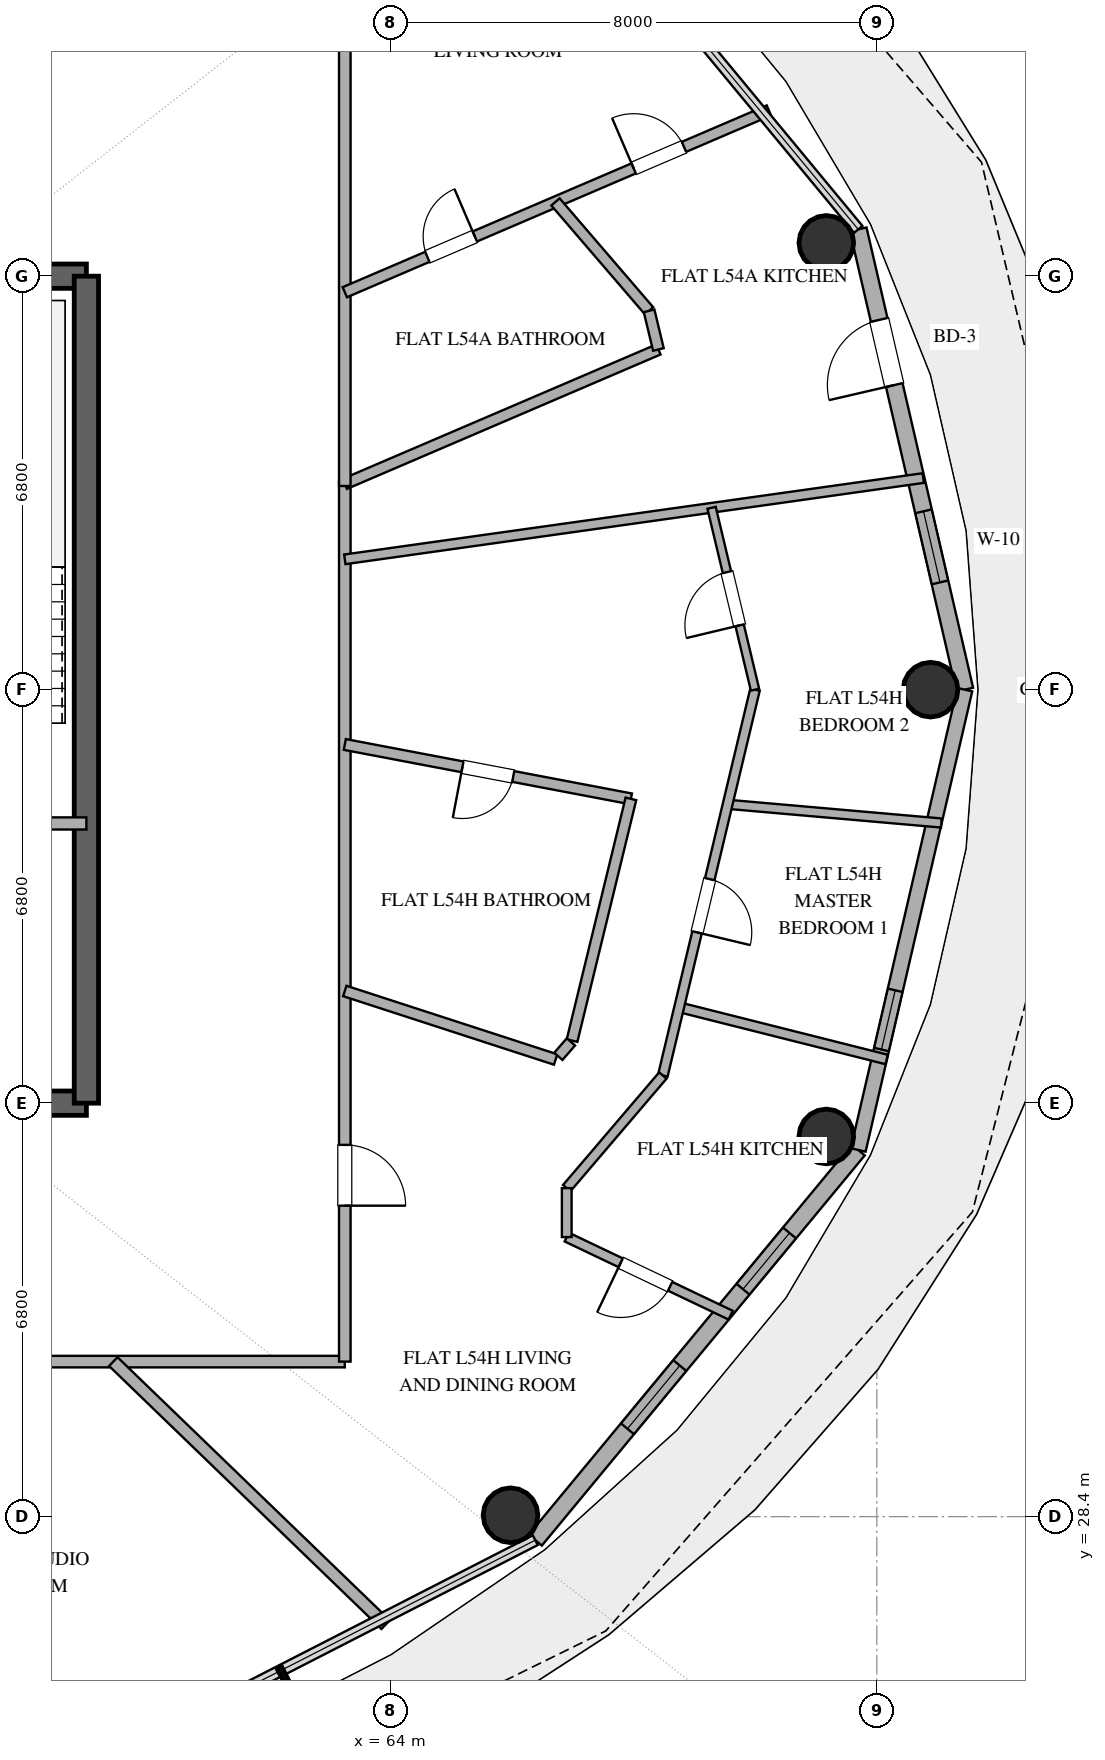
"""IFC4 building model, lengths in metres.
Left out: names, types, materials, properties, quantities, classifications, styles, units other than length and angle.
Written with IfcOpenShell. Run it as: python <this file> out.ifc"""

import sys

from ifc_helpers import new_model, si_unit, direction, frame, frame_2d, origin, origin_2d, place, context, subcontext, project, spatial, rectangle, hollow_circle, extrude, element, fill, save


model = new_model("IFC4")
c1 = context("Model", 3, precision=1e-05, world=origin(), true_north=direction((0.0, 1.0)))
c2 = subcontext(c1, "Body", "Model", "MODEL_VIEW")
j1 = project(units=[si_unit("LENGTHUNIT", "METRE"), si_unit("PLANEANGLEUNIT", "RADIAN")], contexts=[c1])
p1 = place(None, origin())
s1 = spatial("IfcSite", under=j1, at=p1, CompositionType="ELEMENT")
p2 = place(p1, origin())
s2 = spatial("IfcBuilding", under=s1, at=p2, CompositionType="ELEMENT")
p3 = place(p2, frame((0.0, 0.0, 213.6)))
s3 = spatial("IfcBuildingStorey", under=s2, at=p3, CompositionType="ELEMENT", Elevation=213.6)
p4 = place(p3, frame((55.0, 35.2, 0.0), z_axis=(0.0, 0.0, 1.0), x_axis=(1.0, 0.0, 0.0)))
e1 = element("IfcWall", 1, at=p4, inside=s3, PredefinedType="SHEAR", context=c2, shape_type="SweptSolid", body=[
    extrude(rectangle(XDim=4.0, YDim=0.4, at=frame_2d((2.0, 0.0))), origin(), (0.0, 0.0, 1.0), 3.36),
])
p5 = place(p4, frame((1.4, 0.0, 0.0)))
e2 = element("IfcOpeningElement", 2, at=p5, cuts=e1, PredefinedType="OPENING", context=c2, shape_type="SweptSolid", body=[
    extrude(rectangle(XDim=1.2, YDim=2.15, at=frame_2d((0.6, 1.075))), frame((0.0, 0.21, 0.0), z_axis=(0.0, -1.0, 0.0), x_axis=(1.0, 0.0, 0.0)), (0.0, 0.0, 1.0), 0.42),
])
p6 = place(p3, frame((55.0, 48.8, 0.0), z_axis=(0.0, 0.0, 1.0), x_axis=(1.0, 0.0, 0.0)))
e3 = element("IfcWall", 3, at=p6, inside=s3, PredefinedType="SHEAR", context=c2, shape_type="SweptSolid", body=[
    extrude(rectangle(XDim=4.0, YDim=0.4, at=frame_2d((2.0, 0.0))), origin(), (0.0, 0.0, 1.0), 3.36),
])
p7 = place(p3, frame((59.0, 35.2, 0.0), z_axis=(0.0, 0.0, 1.0), x_axis=(0.0, 1.0, 0.0)))
e4 = element("IfcWall", 4, at=p7, inside=s3, PredefinedType="SHEAR", context=c2, shape_type="SweptSolid", body=[
    extrude(rectangle(XDim=13.6, YDim=0.4, at=frame_2d((6.8, 0.0))), origin(), (0.0, 0.0, 1.0), 3.36),
])
for number, where, z_axis, x_axis in (
    (5, (72.883, 42.0, 0.0), (0.0, 0.0, 1.0), (1.0, 0.0, 0.0)),
    (6, (71.169, 49.347, 0.0), (0.0, 0.0, 1.0), (1.0, 0.0, 0.0)),
    (7, (65.975, 28.424, 0.0), (0.0, 0.0, 1.0), (1.0, 0.0, 0.0)),
    (8, (71.169, 34.653, 0.0), (0.0, 0.0, 1.0), (1.0, 0.0, 0.0)),
):
    element("IfcColumn", number, at=place(p3, frame(where, z_axis=z_axis, x_axis=x_axis)), inside=s3, PredefinedType="COLUMN", context=c2, shape_type="SweptSolid", body=[
        extrude(hollow_circle(Radius=0.45, WallThickness=0.025, at=origin_2d()), origin(), (0.0, 0.0, 1.0), 3.36),
    ])
p8 = place(p3, frame((73.447, 42.0, 0.0), z_axis=(0.0, 0.0, 1.0), x_axis=(-0.225635078214, 0.974211892495, 0.0)))
e9 = element("IfcWall", 9, at=p8, inside=s3, PredefinedType="SOLIDWALL", context=c2, shape_type="SweptSolid", body=[
    extrude(rectangle(XDim=7.77, YDim=0.28, at=frame_2d((3.885, 0.0))), origin(), (0.0, 0.0, 1.0), 3.36),
])
p9 = place(p8, frame((1.811, 0.0, 0.85)))
e10 = element("IfcOpeningElement", 10, at=p9, cuts=e9, PredefinedType="OPENING", context=c2, shape_type="SweptSolid", body=[
    extrude(rectangle(XDim=1.2, YDim=1.6, at=frame_2d((0.6, 0.8))), frame((0.0, 0.15, 0.0), z_axis=(0.0, -1.0, 0.0), x_axis=(1.0, 0.0, 0.0)), (0.0, 0.0, 1.0), 0.3),
])
p10 = place(p8, frame((5.142, 0.0, 0.0)))
e11 = element("IfcOpeningElement", 11, at=p10, cuts=e9, PredefinedType="OPENING", context=c2, shape_type="SweptSolid", body=[
    extrude(rectangle(XDim=1.1, YDim=2.25, at=frame_2d((0.55, 1.125))), frame((0.0, 0.15, 0.0), z_axis=(0.0, -1.0, 0.0), x_axis=(1.0, 0.0, 0.0)), (0.0, 0.0, 1.0), 0.3),
])
p11 = place(p3, frame((66.383, 28.013, 0.0), z_axis=(0.0, 0.0, 1.0), x_axis=(0.63761509934, 0.770355103243, 0.0)))
e12 = element("IfcWall", 12, at=p11, inside=s3, PredefinedType="SOLIDWALL", context=c2, shape_type="SweptSolid", body=[
    extrude(rectangle(XDim=8.33, YDim=0.28, at=frame_2d((4.165, 0.0))), origin(), (0.0, 0.0, 1.0), 3.36),
])
p12 = place(p11, frame((2.378, 0.0, 0.85)))
e13 = element("IfcOpeningElement", 13, at=p12, cuts=e12, PredefinedType="OPENING", context=c2, shape_type="SweptSolid", body=[
    extrude(rectangle(XDim=1.35, YDim=1.8, at=frame_2d((0.675, 0.9))), frame((0.0, 0.15, 0.0), z_axis=(0.0, -1.0, 0.0), x_axis=(1.0, 0.0, 0.0)), (0.0, 0.0, 1.0), 0.3),
])
p13 = place(p11, frame((5.358, 0.0, 0.85)))
e14 = element("IfcOpeningElement", 14, at=p13, cuts=e12, PredefinedType="OPENING", context=c2, shape_type="SweptSolid", body=[
    extrude(rectangle(XDim=1.2, YDim=1.8, at=frame_2d((0.6, 0.9))), frame((0.0, 0.15, 0.0), z_axis=(0.0, -1.0, 0.0), x_axis=(1.0, 0.0, 0.0)), (0.0, 0.0, 1.0), 0.3),
])
p14 = place(p3, frame((71.694, 34.43, 0.0), z_axis=(0.0, 0.0, 1.0), x_axis=(0.225635078214, 0.974211892495, 0.0)))
e15 = element("IfcWall", 15, at=p14, inside=s3, PredefinedType="SOLIDWALL", context=c2, shape_type="SweptSolid", body=[
    extrude(rectangle(XDim=7.77, YDim=0.25, at=frame_2d((3.885, 0.0))), origin(), (0.0, 0.0, 1.0), 3.36),
])
p15 = place(p14, frame((1.695, 0.0, 1.42)))
e16 = element("IfcOpeningElement", 16, at=p15, cuts=e15, PredefinedType="OPENING", context=c2, shape_type="SweptSolid", body=[
    extrude(rectangle(XDim=1.0, YDim=1.05, at=frame_2d((0.5, 0.525))), frame((0.0, 0.135, 0.0), z_axis=(0.0, -1.0, 0.0), x_axis=(1.0, 0.0, 0.0)), (0.0, 0.0, 1.0), 0.27),
])
p16 = place(p3, frame((55.0, 39.8, 0.0), z_axis=(0.0, 0.0, 1.0), x_axis=(1.0, 0.0, 0.0)))
e17 = element("IfcWall", 17, at=p16, inside=s3, PredefinedType="SOLIDWALL", context=c2, shape_type="SweptSolid", body=[
    extrude(rectangle(XDim=4.0, YDim=0.2, at=frame_2d((2.0, 0.0))), origin(), (0.0, 0.0, 1.0), 2.72),
])
p17 = place(p16, frame((1.45, 0.0, 0.0)))
e18 = element("IfcOpeningElement", 18, at=p17, cuts=e17, PredefinedType="OPENING", context=c2, shape_type="SweptSolid", body=[
    extrude(rectangle(XDim=1.1, YDim=2.15, at=frame_2d((0.55, 1.075))), frame((0.0, 0.11, 0.0), z_axis=(0.0, -1.0, 0.0), x_axis=(1.0, 0.0, 0.0)), (0.0, 0.0, 1.0), 0.22),
])
p18 = place(p3, frame((50.961, 30.95, 0.0), z_axis=(0.0, 0.0, 1.0), x_axis=(1.0, 0.0, 0.0)))
e19 = element("IfcWall", 19, at=p18, inside=s3, PredefinedType="PARTITIONING", context=c2, shape_type="SweptSolid", body=[
    extrude(rectangle(XDim=12.289, YDim=0.19, at=frame_2d((6.145, 0.0))), origin(), (0.0, 0.0, 1.0), 2.72),
])
p19 = place(p18, frame((3.741, 0.0, 0.0)))
e20 = element("IfcOpeningElement", 20, at=p19, cuts=e19, PredefinedType="OPENING", context=c2, shape_type="SweptSolid", body=[
    extrude(rectangle(XDim=1.0, YDim=2.2, at=frame_2d((0.5, 1.1))), frame((0.0, 0.105, 0.0), z_axis=(0.0, -1.0, 0.0), x_axis=(1.0, 0.0, 0.0)), (0.0, 0.0, 1.0), 0.21),
])
p20 = place(p3, frame((63.921, 26.625, 0.0), z_axis=(0.0, 0.0, 1.0), x_axis=(-0.719350784266, 0.69464699609, 0.0)))
e21 = element("IfcWall", 21, at=p20, inside=s3, PredefinedType="PARTITIONING", context=c2, shape_type="SweptSolid", body=[
    extrude(rectangle(XDim=6.226, YDim=0.2, at=frame_2d((3.113, 0.0))), origin(), (0.0, 0.0, 1.0), 2.72),
])
p21 = place(p3, frame((63.25, 45.419, 0.0), z_axis=(0.0, 0.0, 1.0), x_axis=(0.0, -1.0, 0.0)))
e22 = element("IfcWall", 22, at=p21, inside=s3, PredefinedType="PARTITIONING", context=c2, shape_type="SweptSolid", body=[
    extrude(rectangle(XDim=14.469, YDim=0.19, at=frame_2d((7.235, 0.0))), origin(), (0.0, 0.0, 1.0), 2.72),
])
p22 = place(p21, frame((10.905, 0.0, 0.0)))
e23 = element("IfcOpeningElement", 23, at=p22, cuts=e22, PredefinedType="OPENING", context=c2, shape_type="SweptSolid", body=[
    extrude(rectangle(XDim=1.0, YDim=2.2, at=frame_2d((0.5, 1.1))), frame((0.0, 0.105, 0.0), z_axis=(0.0, -1.0, 0.0), x_axis=(1.0, 0.0, 0.0)), (0.0, 0.0, 1.0), 0.21),
])
p23 = place(p3, frame((63.25, 44.143, 0.0), z_axis=(0.0, 0.0, 1.0), x_axis=(0.990269661234, 0.139161769316, 0.0)))
e24 = element("IfcWall", 24, at=p23, inside=s3, PredefinedType="PLUMBINGWALL", context=c2, shape_type="SweptSolid", body=[
    extrude(rectangle(XDim=9.607, YDim=0.16, at=frame_2d((4.803, 0.0))), origin(), (0.0, 0.0, 1.0), 2.72),
])
p24 = place(p3, frame((68.407, 47.595, 0.0), z_axis=(0.0, 0.0, 1.0), x_axis=(-0.919138278408, -0.393935051963, 0.0)))
e25 = element("IfcWall", 25, at=p24, inside=s3, PredefinedType="PLUMBINGWALL", context=c2, shape_type="SweptSolid", body=[
    extrude(rectangle(XDim=5.611, YDim=0.18, at=frame_2d((2.806, 0.0))), origin(), (0.0, 0.0, 1.0), 2.72),
])
p25 = place(p3, frame((67.955, 40.205, 0.0), z_axis=(0.0, 0.0, 1.0), x_axis=(-0.982404536053, 0.186765434551, 0.0)))
e26 = element("IfcWall", 26, at=p25, inside=s3, PredefinedType="PLUMBINGWALL", context=c2, shape_type="SweptSolid", body=[
    extrude(rectangle(XDim=4.79, YDim=0.18, at=frame_2d((2.395, 0.0))), origin(), (0.0, 0.0, 1.0), 2.72),
])
p26 = place(p25, frame((1.97, 0.0, 0.0)))
e27 = element("IfcOpeningElement", 27, at=p26, cuts=e26, PredefinedType="OPENING", context=c2, shape_type="SweptSolid", body=[
    extrude(rectangle(XDim=0.85, YDim=2.1, at=frame_2d((0.425, 1.05))), frame((0.0, 0.1, 0.0), z_axis=(0.0, -1.0, 0.0), x_axis=(1.0, 0.0, 0.0)), (0.0, 0.0, 1.0), 0.2),
])
p27 = place(p3, frame((63.25, 45.35, 0.0), z_axis=(0.0, 0.0, 1.0), x_axis=(0.0, 1.0, 0.0)))
e28 = element("IfcWall", 28, at=p27, inside=s3, PredefinedType="PARTITIONING", context=c2, shape_type="SweptSolid", body=[
    extrude(rectangle(XDim=7.7, YDim=0.19, at=frame_2d((3.85, 0.0))), origin(), (0.0, 0.0, 1.0), 2.72),
])
p28 = place(p3, frame((66.988, 36.229, 0.0), z_axis=(0.0, 0.0, 1.0), x_axis=(0.236522101202, 0.971626108975, 0.0)))
e29 = element("IfcWall", 29, at=p28, inside=s3, PredefinedType="PLUMBINGWALL", context=c2, shape_type="SweptSolid", body=[
    extrude(rectangle(XDim=4.092, YDim=0.18, at=frame_2d((2.046, 0.0))), origin(), (0.0, 0.0, 1.0), 2.72),
])
p29 = place(p3, frame((63.25, 48.536, 0.0), z_axis=(0.0, 0.0, 1.0), x_axis=(0.919133380172, 0.393946480443, 0.0)))
e30 = element("IfcWall", 30, at=p29, inside=s3, PredefinedType="PLUMBINGWALL", context=c2, shape_type="SweptSolid", body=[
    extrude(rectangle(XDim=7.588, YDim=0.18, at=frame_2d((3.794, 0.0))), origin(), (0.0, 0.0, 1.0), 2.72),
])
p30 = place(p29, frame((5.169, 0.0, 0.0)))
e31 = element("IfcOpeningElement", 31, at=p30, cuts=e30, PredefinedType="OPENING", context=c2, shape_type="SweptSolid", body=[
    extrude(rectangle(XDim=0.9, YDim=2.1, at=frame_2d((0.45, 1.05))), frame((0.0, 0.1, 0.0), z_axis=(0.0, -1.0, 0.0), x_axis=(1.0, 0.0, 0.0)), (0.0, 0.0, 1.0), 0.2),
])
p31 = place(p29, frame((1.477, 0.0, 0.0)))
e32 = element("IfcOpeningElement", 32, at=p31, cuts=e30, PredefinedType="OPENING", context=c2, shape_type="SweptSolid", body=[
    extrude(rectangle(XDim=0.85, YDim=2.1, at=frame_2d((0.425, 1.05))), frame((0.0, 0.1, 0.0), z_axis=(0.0, -1.0, 0.0), x_axis=(1.0, 0.0, 0.0)), (0.0, 0.0, 1.0), 0.2),
])
p32 = place(p3, frame((63.25, 37.045, 0.0), z_axis=(0.0, 0.0, 1.0), x_axis=(0.951066543841, -0.308986131058, 0.0)))
e33 = element("IfcWall", 33, at=p32, inside=s3, PredefinedType="PLUMBINGWALL", context=c2, shape_type="SweptSolid", body=[
    extrude(rectangle(XDim=3.646, YDim=0.18, at=frame_2d((1.823, 0.0))), origin(), (0.0, 0.0, 1.0), 2.72),
])
p33 = place(p3, frame((73.061, 39.807, 0.0), z_axis=(0.0, 0.0, 1.0), x_axis=(-0.996192140099, 0.087184975795, 0.0)))
e34 = element("IfcWall", 34, at=p33, inside=s3, PredefinedType="PARTITIONING", context=c2, shape_type="SweptSolid", body=[
    extrude(rectangle(XDim=3.528, YDim=0.15, at=frame_2d((1.764, 0.0))), origin(), (0.0, 0.0, 1.0), 2.72),
])
p34 = place(p3, frame((68.749, 36.778, 0.0), z_axis=(0.0, 0.0, 1.0), x_axis=(0.96975767026, -0.244069787092, 0.0)))
e35 = element("IfcWall", 35, at=p34, inside=s3, PredefinedType="PLUMBINGWALL", context=c2, shape_type="SweptSolid", body=[
    extrude(rectangle(XDim=3.519, YDim=0.16, at=frame_2d((1.76, 0.0))), origin(), (0.0, 0.0, 1.0), 2.72),
])
p35 = place(p3, frame((69.996, 42.0, 0.0), z_axis=(0.0, 0.0, 1.0), x_axis=(-0.232298462197, -0.972644551962, 0.0)))
e36 = element("IfcWall", 36, at=p35, inside=s3, PredefinedType="PLUMBINGWALL", context=c2, shape_type="SweptSolid", body=[
    extrude(rectangle(XDim=6.523, YDim=0.16, at=frame_2d((3.262, 0.0))), origin(), (0.0, 0.0, 1.0), 2.72),
])
p36 = place(p35, frame((3.204, 0.0, 0.0)))
e37 = element("IfcOpeningElement", 37, at=p36, cuts=e36, PredefinedType="OPENING", context=c2, shape_type="SweptSolid", body=[
    extrude(rectangle(XDim=0.9, YDim=2.1, at=frame_2d((0.45, 1.05))), frame((0.0, 0.09, 0.0), z_axis=(0.0, -1.0, 0.0), x_axis=(1.0, 0.0, 0.0)), (0.0, 0.0, 1.0), 0.18),
])
p37 = place(p3, frame((69.996, 42.0, 0.0), z_axis=(0.0, 0.0, 1.0), x_axis=(-0.23230382896, 0.972643270192, 0.0)))
e38 = element("IfcWall", 38, at=p37, inside=s3, PredefinedType="PARTITIONING", context=c2, shape_type="SweptSolid", body=[
    extrude(rectangle(XDim=3.075, YDim=0.14, at=frame_2d((1.538, 0.0))), origin(), (0.0, 0.0, 1.0), 2.72),
])
p38 = place(p37, frame((1.088, 0.0, 0.0)))
e39 = element("IfcOpeningElement", 39, at=p38, cuts=e38, PredefinedType="OPENING", context=c2, shape_type="SweptSolid", body=[
    extrude(rectangle(XDim=0.9, YDim=2.1, at=frame_2d((0.45, 1.05))), frame((0.0, 0.08, 0.0), z_axis=(0.0, -1.0, 0.0), x_axis=(1.0, 0.0, 0.0)), (0.0, 0.0, 1.0), 0.16),
])
p39 = place(p3, frame((69.596, 31.714, 0.0), z_axis=(0.0, 0.0, 1.0), x_axis=(-0.902830295341, 0.42999704396, 0.0)))
e40 = element("IfcWall", 40, at=p39, inside=s3, PredefinedType="PLUMBINGWALL", context=c2, shape_type="SweptSolid", body=[
    extrude(rectangle(XDim=2.987, YDim=0.16, at=frame_2d((1.493, 0.0))), origin(), (0.0, 0.0, 1.0), 2.72),
])
p40 = place(p39, frame((1.103, 0.0, 0.0)))
e41 = element("IfcOpeningElement", 41, at=p40, cuts=e40, PredefinedType="OPENING", context=c2, shape_type="SweptSolid", body=[
    extrude(rectangle(XDim=0.9, YDim=2.1, at=frame_2d((0.45, 1.05))), frame((0.0, 0.09, 0.0), z_axis=(0.0, -1.0, 0.0), x_axis=(1.0, 0.0, 0.0)), (0.0, 0.0, 1.0), 0.18),
])
p41 = place(p3, frame((66.9, 33.803, 0.0), z_axis=(0.0, 0.0, 1.0), x_axis=(0.649270866973, 0.760557257082, 0.0)))
e42 = element("IfcWall", 42, at=p41, inside=s3, PredefinedType="PLUMBINGWALL", context=c2, shape_type="SweptSolid", body=[
    extrude(rectangle(XDim=2.435, YDim=0.16, at=frame_2d((1.218, 0.0))), origin(), (0.0, 0.0, 1.0), 2.72),
])
p42 = place(p3, frame((66.715, 50.021, 0.0), z_axis=(0.0, 0.0, 1.0), x_axis=(0.651871704999, -0.758329268999, 0.0)))
e43 = element("IfcWall", 43, at=p42, inside=s3, PredefinedType="PLUMBINGWALL", context=c2, shape_type="SweptSolid", body=[
    extrude(rectangle(XDim=2.362, YDim=0.18, at=frame_2d((1.181, 0.0))), origin(), (0.0, 0.0, 1.0), 2.72),
])
p43 = place(p3, frame((66.9, 32.998, 0.0), z_axis=(0.0, 0.0, 1.0), x_axis=(0.0, 1.0, 0.0)))
e44 = element("IfcWall", 44, at=p43, inside=s3, PredefinedType="PLUMBINGWALL", context=c2, shape_type="SweptSolid", body=[
    extrude(rectangle(XDim=0.805, YDim=0.16, at=frame_2d((0.402, 0.0))), origin(), (0.0, 0.0, 1.0), 2.72),
])
p44 = place(p3, frame((68.255, 48.23, 0.0), z_axis=(0.0, 0.0, 1.0), x_axis=(0.233909944351, -0.972258267095, 0.0)))
e45 = element("IfcWall", 45, at=p44, inside=s3, PredefinedType="PLUMBINGWALL", context=c2, shape_type="SweptSolid", body=[
    extrude(rectangle(XDim=0.653, YDim=0.18, at=frame_2d((0.327, 0.0))), origin(), (0.0, 0.0, 1.0), 2.72),
])
p45 = place(p3, frame((66.762, 35.97, 0.0), z_axis=(0.0, 0.0, 1.0), x_axis=(0.656312676344, 0.754489013088, 0.0)))
e46 = element("IfcWall", 46, at=p45, inside=s3, PredefinedType="PLUMBINGWALL", context=c2, shape_type="SweptSolid", body=[
    extrude(rectangle(XDim=0.316, YDim=0.18, at=frame_2d((0.158, 0.0))), origin(), (0.0, 0.0, 1.0), 2.72),
])
p46 = place(p9, origin())
e47 = element("IfcWindow", 47, at=p46, inside=s3, PartitioningType="SINGLE_PANEL", PredefinedType="WINDOW", context=c2, shape_type="SweptSolid", body=[
    extrude(rectangle(XDim=1.2, YDim=1.6, at=frame_2d((0.6, 0.8))), frame((0.0, 0.03, 0.0), z_axis=(0.0, -1.0, 0.0), x_axis=(1.0, 0.0, 0.0)), (0.0, 0.0, 1.0), 0.06),
])
fill(e10, e47)
p47 = place(p10, origin())
e48 = element("IfcDoor", 48, at=p47, inside=s3, OperationType="SINGLE_SWING_LEFT", PredefinedType="DOOR", context=c2, shape_type="SweptSolid", body=[
    extrude(rectangle(XDim=1.1, YDim=2.25, at=frame_2d((0.55, 1.125))), frame((0.0, 0.025, 0.0), z_axis=(0.0, -1.0, 0.0), x_axis=(1.0, 0.0, 0.0)), (0.0, 0.0, 1.0), 0.05),
])
fill(e11, e48)
p48 = place(p12, origin())
e49 = element("IfcWindow", 49, at=p48, inside=s3, PartitioningType="SINGLE_PANEL", PredefinedType="WINDOW", context=c2, shape_type="SweptSolid", body=[
    extrude(rectangle(XDim=1.35, YDim=1.8, at=frame_2d((0.675, 0.9))), frame((0.0, 0.03, 0.0), z_axis=(0.0, -1.0, 0.0), x_axis=(1.0, 0.0, 0.0)), (0.0, 0.0, 1.0), 0.06),
])
fill(e13, e49)
p49 = place(p13, origin())
e50 = element("IfcWindow", 50, at=p49, inside=s3, PartitioningType="SINGLE_PANEL", PredefinedType="WINDOW", context=c2, shape_type="SweptSolid", body=[
    extrude(rectangle(XDim=1.2, YDim=1.8, at=frame_2d((0.6, 0.9))), frame((0.0, 0.03, 0.0), z_axis=(0.0, -1.0, 0.0), x_axis=(1.0, 0.0, 0.0)), (0.0, 0.0, 1.0), 0.06),
])
fill(e14, e50)
p50 = place(p15, origin())
e51 = element("IfcWindow", 51, at=p50, inside=s3, PartitioningType="SINGLE_PANEL", PredefinedType="WINDOW", context=c2, shape_type="SweptSolid", body=[
    extrude(rectangle(XDim=1.0, YDim=1.05, at=frame_2d((0.5, 0.525))), frame((0.0, 0.03, 0.0), z_axis=(0.0, -1.0, 0.0), x_axis=(1.0, 0.0, 0.0)), (0.0, 0.0, 1.0), 0.06),
])
fill(e16, e51)
p51 = place(p22, origin())
e52 = element("IfcDoor", 52, at=p51, inside=s3, OperationType="SINGLE_SWING_RIGHT", PredefinedType="DOOR", context=c2, shape_type="SweptSolid", body=[
    extrude(rectangle(XDim=1.0, YDim=2.2, at=frame_2d((0.5, 1.1))), frame((0.0, 0.025, 0.0), z_axis=(0.0, -1.0, 0.0), x_axis=(1.0, 0.0, 0.0)), (0.0, 0.0, 1.0), 0.05),
])
fill(e23, e52)
p52 = place(p26, origin())
e53 = element("IfcDoor", 53, at=p52, inside=s3, OperationType="SINGLE_SWING_RIGHT", PredefinedType="DOOR", context=c2, shape_type="SweptSolid", body=[
    extrude(rectangle(XDim=0.85, YDim=2.1, at=frame_2d((0.425, 1.05))), frame((0.0, 0.025, 0.0), z_axis=(0.0, -1.0, 0.0), x_axis=(1.0, 0.0, 0.0)), (0.0, 0.0, 1.0), 0.05),
])
fill(e27, e53)
p53 = place(p30, origin())
e54 = element("IfcDoor", 54, at=p53, inside=s3, OperationType="SINGLE_SWING_LEFT", PredefinedType="DOOR", context=c2, shape_type="SweptSolid", body=[
    extrude(rectangle(XDim=0.9, YDim=2.1, at=frame_2d((0.45, 1.05))), frame((0.0, 0.025, 0.0), z_axis=(0.0, -1.0, 0.0), x_axis=(1.0, 0.0, 0.0)), (0.0, 0.0, 1.0), 0.05),
])
fill(e31, e54)
p54 = place(p31, origin())
e55 = element("IfcDoor", 55, at=p54, inside=s3, OperationType="SINGLE_SWING_RIGHT", PredefinedType="DOOR", context=c2, shape_type="SweptSolid", body=[
    extrude(rectangle(XDim=0.85, YDim=2.1, at=frame_2d((0.425, 1.05))), frame((0.0, 0.025, 0.0), z_axis=(0.0, -1.0, 0.0), x_axis=(1.0, 0.0, 0.0)), (0.0, 0.0, 1.0), 0.05),
])
fill(e32, e55)
p55 = place(p36, origin())
e56 = element("IfcDoor", 56, at=p55, inside=s3, OperationType="SINGLE_SWING_RIGHT", PredefinedType="DOOR", context=c2, shape_type="SweptSolid", body=[
    extrude(rectangle(XDim=0.9, YDim=2.1, at=frame_2d((0.45, 1.05))), frame((0.0, 0.025, 0.0), z_axis=(0.0, -1.0, 0.0), x_axis=(1.0, 0.0, 0.0)), (0.0, 0.0, 1.0), 0.05),
])
fill(e37, e56)
p56 = place(p38, origin())
e57 = element("IfcDoor", 57, at=p56, inside=s3, OperationType="SINGLE_SWING_LEFT", PredefinedType="DOOR", context=c2, shape_type="SweptSolid", body=[
    extrude(rectangle(XDim=0.9, YDim=2.1, at=frame_2d((0.45, 1.05))), frame((0.0, 0.025, 0.0), z_axis=(0.0, -1.0, 0.0), x_axis=(1.0, 0.0, 0.0)), (0.0, 0.0, 1.0), 0.05),
])
fill(e39, e57)
p57 = place(p40, origin())
e58 = element("IfcDoor", 58, at=p57, inside=s3, OperationType="SINGLE_SWING_RIGHT", PredefinedType="DOOR", context=c2, shape_type="SweptSolid", body=[
    extrude(rectangle(XDim=0.9, YDim=2.1, at=frame_2d((0.45, 1.05))), frame((0.0, 0.025, 0.0), z_axis=(0.0, -1.0, 0.0), x_axis=(1.0, 0.0, 0.0)), (0.0, 0.0, 1.0), 0.05),
])
fill(e41, e58)
save(model, sys.argv[1])
